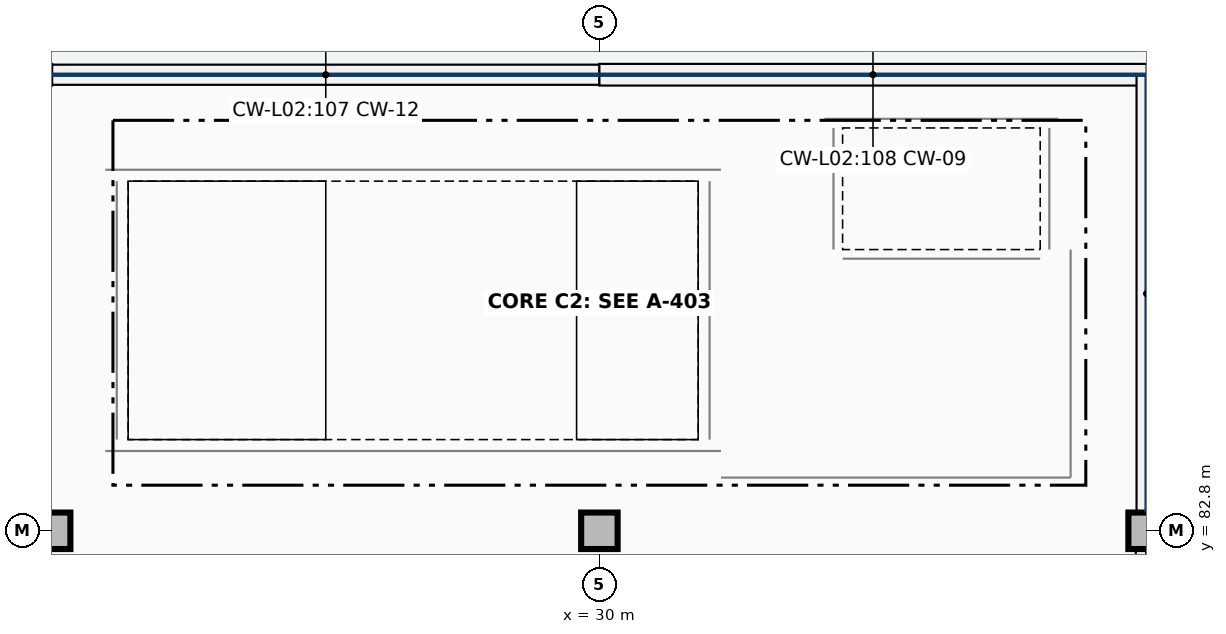
"""IFC4 building model, lengths in metres.
Left out: names, types, materials, properties, quantities, classifications, styles, units other than length and angle.
Written with IfcOpenShell. Run it as: python <this file> out.ifc"""

import sys

from ifc_helpers import new_model, si_unit, direction, frame, frame_2d, origin, origin_2d, place, context, subcontext, project, spatial, rectangle, extrude, element, fill, save


model = new_model("IFC4")
c1 = context("Model", 3, precision=1e-05, world=origin(), true_north=direction((0.0, 1.0)))
c2 = subcontext(c1, "Body", "Model", "MODEL_VIEW")
j1 = project(units=[si_unit("LENGTHUNIT", "METRE"), si_unit("PLANEANGLEUNIT", "RADIAN")], contexts=[c1])
p1 = place(None, origin())
s1 = spatial("IfcSite", under=j1, at=p1, CompositionType="ELEMENT")
p2 = place(p1, origin())
s2 = spatial("IfcBuilding", under=s1, at=p2, CompositionType="ELEMENT")
p3 = place(p2, frame((0.0, 0.0, 9.52)))
s3 = spatial("IfcBuildingStorey", under=s2, at=p3, CompositionType="ELEMENT", Elevation=9.52)
for number, where, z_axis, x_axis in (
    (1, (22.8, 82.8, 0.0), (0.0, 0.0, 1.0), (1.0, 0.0, 0.0)),
    (2, (30.0, 82.8, 0.0), (0.0, 0.0, 1.0), (1.0, 0.0, 0.0)),
    (3, (37.2, 82.8, 0.0), (0.0, 0.0, 1.0), (1.0, 0.0, 0.0)),
):
    element("IfcColumn", number, at=place(p3, frame(where, z_axis=z_axis, x_axis=x_axis)), inside=s3, PredefinedType="COLUMN", context=c2, shape_type="SweptSolid", body=[
        extrude(rectangle(XDim=0.48, YDim=0.48, at=origin_2d()), origin(), (0.0, 0.0, 1.0), 4.08),
    ])
p4 = place(p3, frame((15.6, 88.8, 0.0), z_axis=(0.0, 0.0, 1.0), x_axis=(1.0, 0.0, 0.0)))
e4 = element("IfcWall", 4, at=p4, inside=s3, PredefinedType="SOLIDWALL", context=c2, shape_type="SweptSolid", body=[
    extrude(rectangle(XDim=7.2, YDim=0.285, at=frame_2d((3.6, 0.0))), origin(), (0.0, 0.0, 1.0), 0.85),
])
p5 = place(p3, frame((22.8, 88.8, 0.0), z_axis=(0.0, 0.0, 1.0), x_axis=(1.0, 0.0, 0.0)))
e5 = element("IfcWall", 5, at=p5, inside=s3, PredefinedType="SOLIDWALL", context=c2, shape_type="SweptSolid", body=[
    extrude(rectangle(XDim=7.2, YDim=0.265, at=frame_2d((3.6, 0.0))), origin(), (0.0, 0.0, 1.0), 0.85),
])
p6 = place(p3, frame((30.0, 88.8, 0.0), z_axis=(0.0, 0.0, 1.0), x_axis=(1.0, 0.0, 0.0)))
e6 = element("IfcWall", 6, at=p6, inside=s3, PredefinedType="SOLIDWALL", context=c2, shape_type="SweptSolid", body=[
    extrude(rectangle(XDim=7.2, YDim=0.285, at=frame_2d((3.6, 0.0))), origin(), (0.0, 0.0, 1.0), 0.85),
])
p7 = place(p3, frame((37.2, 79.442, 0.0), z_axis=(0.0, 0.0, 1.0), x_axis=(0.0, 1.0, 0.0)))
e7 = element("IfcWall", 7, at=p7, inside=s3, PredefinedType="SOLIDWALL", context=c2, shape_type="SweptSolid", body=[
    extrude(rectangle(XDim=3.116, YDim=0.285, at=frame_2d((1.558, 0.0))), origin(), (0.0, 0.0, 1.0), 3.299),
])
p8 = place(p3, frame((37.2, 83.042, 0.0), z_axis=(0.0, 0.0, 1.0), x_axis=(0.0, 1.0, 0.0)))
e8 = element("IfcWall", 8, at=p8, inside=s3, PredefinedType="SOLIDWALL", context=c2, shape_type="SweptSolid", body=[
    extrude(rectangle(XDim=5.758, YDim=0.265, at=frame_2d((2.879, 0.0))), origin(), (0.0, 0.0, 1.0), 0.85),
])
p9 = place(p3, frame((23.65, 84.0, 0.0), z_axis=(0.0, 0.0, 1.0), x_axis=(0.0, 1.0, 0.0)))
e9 = element("IfcWall", 9, at=p9, inside=s3, PredefinedType="SHEAR", context=c2, shape_type="SweptSolid", body=[
    extrude(rectangle(XDim=3.4, YDim=0.3, at=frame_2d((1.7, 0.0))), origin(), (0.0, 0.0, 1.0), 4.08),
])
for number, where, z_axis, x_axis in (
    (10, (23.5, 83.85, 0.0), (0.0, 0.0, 1.0), (1.0, 0.0, 0.0)),
    (11, (23.5, 87.55, 0.0), (0.0, 0.0, 1.0), (1.0, 0.0, 0.0)),
):
    element("IfcWall", number, at=place(p3, frame(where, z_axis=z_axis, x_axis=x_axis)), inside=s3, PredefinedType="SHEAR", context=c2, shape_type="SweptSolid", body=[
        extrude(rectangle(XDim=8.1, YDim=0.3, at=frame_2d((4.05, 0.0))), origin(), (0.0, 0.0, 1.0), 4.08),
    ])
p10 = place(p3, frame((31.45, 84.0, 0.0), z_axis=(0.0, 0.0, 1.0), x_axis=(0.0, 1.0, 0.0)))
e12 = element("IfcWall", 12, at=p10, inside=s3, PredefinedType="SHEAR", context=c2, shape_type="SweptSolid", body=[
    extrude(rectangle(XDim=3.4, YDim=0.3, at=frame_2d((1.7, 0.0))), origin(), (0.0, 0.0, 1.0), 4.08),
])
p11 = place(p10, frame((0.65, 0.0, 0.0)))
e13 = element("IfcOpeningElement", 13, at=p11, cuts=e12, PredefinedType="OPENING", context=c2, shape_type="SweptSolid", body=[
    extrude(rectangle(XDim=1.2, YDim=2.2, at=frame_2d((0.6, 1.1))), frame((0.0, 0.16, 0.0), z_axis=(0.0, -1.0, 0.0), x_axis=(1.0, 0.0, 0.0)), (0.0, 0.0, 1.0), 0.32),
])
for number, where, z_axis, x_axis in (
    (14, (33.08, 86.5, 0.0), (0.0, 0.0, 1.0), (0.0, 1.0, 0.0)),
    (15, (35.92, 86.5, 0.0), (0.0, 0.0, 1.0), (0.0, 1.0, 0.0)),
):
    element("IfcWall", number, at=place(p3, frame(where, z_axis=z_axis, x_axis=x_axis)), inside=s3, PredefinedType="SHEAR", context=c2, shape_type="SweptSolid", body=[
        extrude(rectangle(XDim=1.6, YDim=0.24, at=frame_2d((0.8, 0.0))), origin(), (0.0, 0.0, 1.0), 4.08),
    ])
p12 = place(p3, frame((32.96, 88.22, 0.0), z_axis=(0.0, 0.0, 1.0), x_axis=(1.0, 0.0, 0.0)))
e16 = element("IfcWall", 16, at=p12, inside=s3, PredefinedType="SHEAR", context=c2, shape_type="SweptSolid", body=[
    extrude(rectangle(XDim=3.08, YDim=0.24, at=frame_2d((1.54, 0.0))), origin(), (0.0, 0.0, 1.0), 4.08),
])
p13 = place(p3, frame((33.2, 86.38, 0.0), z_axis=(0.0, 0.0, 1.0), x_axis=(1.0, 0.0, 0.0)))
e17 = element("IfcWall", 17, at=p13, inside=s3, PredefinedType="SHEAR", context=c2, shape_type="SweptSolid", body=[
    extrude(rectangle(XDim=2.6, YDim=0.24, at=frame_2d((1.3, 0.0))), origin(), (0.0, 0.0, 1.0), 4.08),
])
p14 = place(p13, frame((0.8, 0.0, 0.0)))
e18 = element("IfcOpeningElement", 18, at=p14, cuts=e17, PredefinedType="OPENING", context=c2, shape_type="SweptSolid", body=[
    extrude(rectangle(XDim=1.0, YDim=2.15, at=frame_2d((0.5, 1.075))), frame((0.0, 0.13, 0.0), z_axis=(0.0, -1.0, 0.0), x_axis=(1.0, 0.0, 0.0)), (0.0, 0.0, 1.0), 0.26),
])
p15 = place(p3, frame((36.2, 83.5, 0.0), z_axis=(0.0, 0.0, 1.0), x_axis=(0.0, 1.0, 0.0)))
e19 = element("IfcWall", 19, at=p15, inside=s3, PredefinedType="PARTITIONING", context=c2, shape_type="SweptSolid", body=[
    extrude(rectangle(XDim=3.0, YDim=0.2, at=frame_2d((1.5, 0.0))), origin(), (0.0, 0.0, 1.0), 3.754),
])
p16 = place(p3, frame((31.6, 83.5, 0.0), z_axis=(0.0, 0.0, 1.0), x_axis=(1.0, 0.0, 0.0)))
e20 = element("IfcWall", 20, at=p16, inside=s3, PredefinedType="PARTITIONING", context=c2, shape_type="SweptSolid", body=[
    extrude(rectangle(XDim=4.6, YDim=0.2, at=frame_2d((2.3, 0.0))), origin(), (0.0, 0.0, 1.0), 3.754),
])
p17 = place(p16, frame((1.575, 0.0, 0.0)))
e21 = element("IfcOpeningElement", 21, at=p17, cuts=e20, PredefinedType="OPENING", context=c2, shape_type="SweptSolid", body=[
    extrude(rectangle(XDim=1.45, YDim=2.2, at=frame_2d((0.725, 1.1))), frame((0.0, 0.11, 0.0), z_axis=(0.0, -1.0, 0.0), x_axis=(1.0, 0.0, 0.0)), (0.0, 0.0, 1.0), 0.22),
])
p18 = place(p11, origin())
e22 = element("IfcDoor", 22, at=p18, inside=s3, OperationType="SINGLE_SWING_LEFT", PredefinedType="DOOR", context=c2, shape_type="SweptSolid", body=[
    extrude(rectangle(XDim=1.2, YDim=2.2, at=frame_2d((0.6, 1.1))), frame((0.0, 0.025, 0.0), z_axis=(0.0, -1.0, 0.0), x_axis=(1.0, 0.0, 0.0)), (0.0, 0.0, 1.0), 0.05),
])
fill(e13, e22)
p19 = place(p14, origin())
e23 = element("IfcDoor", 23, at=p19, inside=s3, OperationType="DOUBLE_DOOR_SLIDING", PredefinedType="DOOR", context=c2, shape_type="SweptSolid", body=[
    extrude(rectangle(XDim=1.0, YDim=2.15, at=frame_2d((0.5, 1.075))), frame((0.0, 0.025, 0.0), z_axis=(0.0, -1.0, 0.0), x_axis=(1.0, 0.0, 0.0)), (0.0, 0.0, 1.0), 0.05),
])
fill(e18, e23)
p20 = place(p17, frame((1.45, 0.0, 0.0), z_axis=(0.0, 0.0, 1.0), x_axis=(-1.0, 0.0, 0.0)))
e24 = element("IfcDoor", 24, at=p20, inside=s3, OperationType="DOUBLE_DOOR_SINGLE_SWING", PredefinedType="DOOR", context=c2, shape_type="SweptSolid", body=[
    extrude(rectangle(XDim=1.45, YDim=2.2, at=frame_2d((0.725, 1.1))), frame((0.0, 0.025, 0.0), z_axis=(0.0, -1.0, 0.0), x_axis=(1.0, 0.0, 0.0)), (0.0, 0.0, 1.0), 0.05),
])
fill(e21, e24)
save(model, sys.argv[1])
